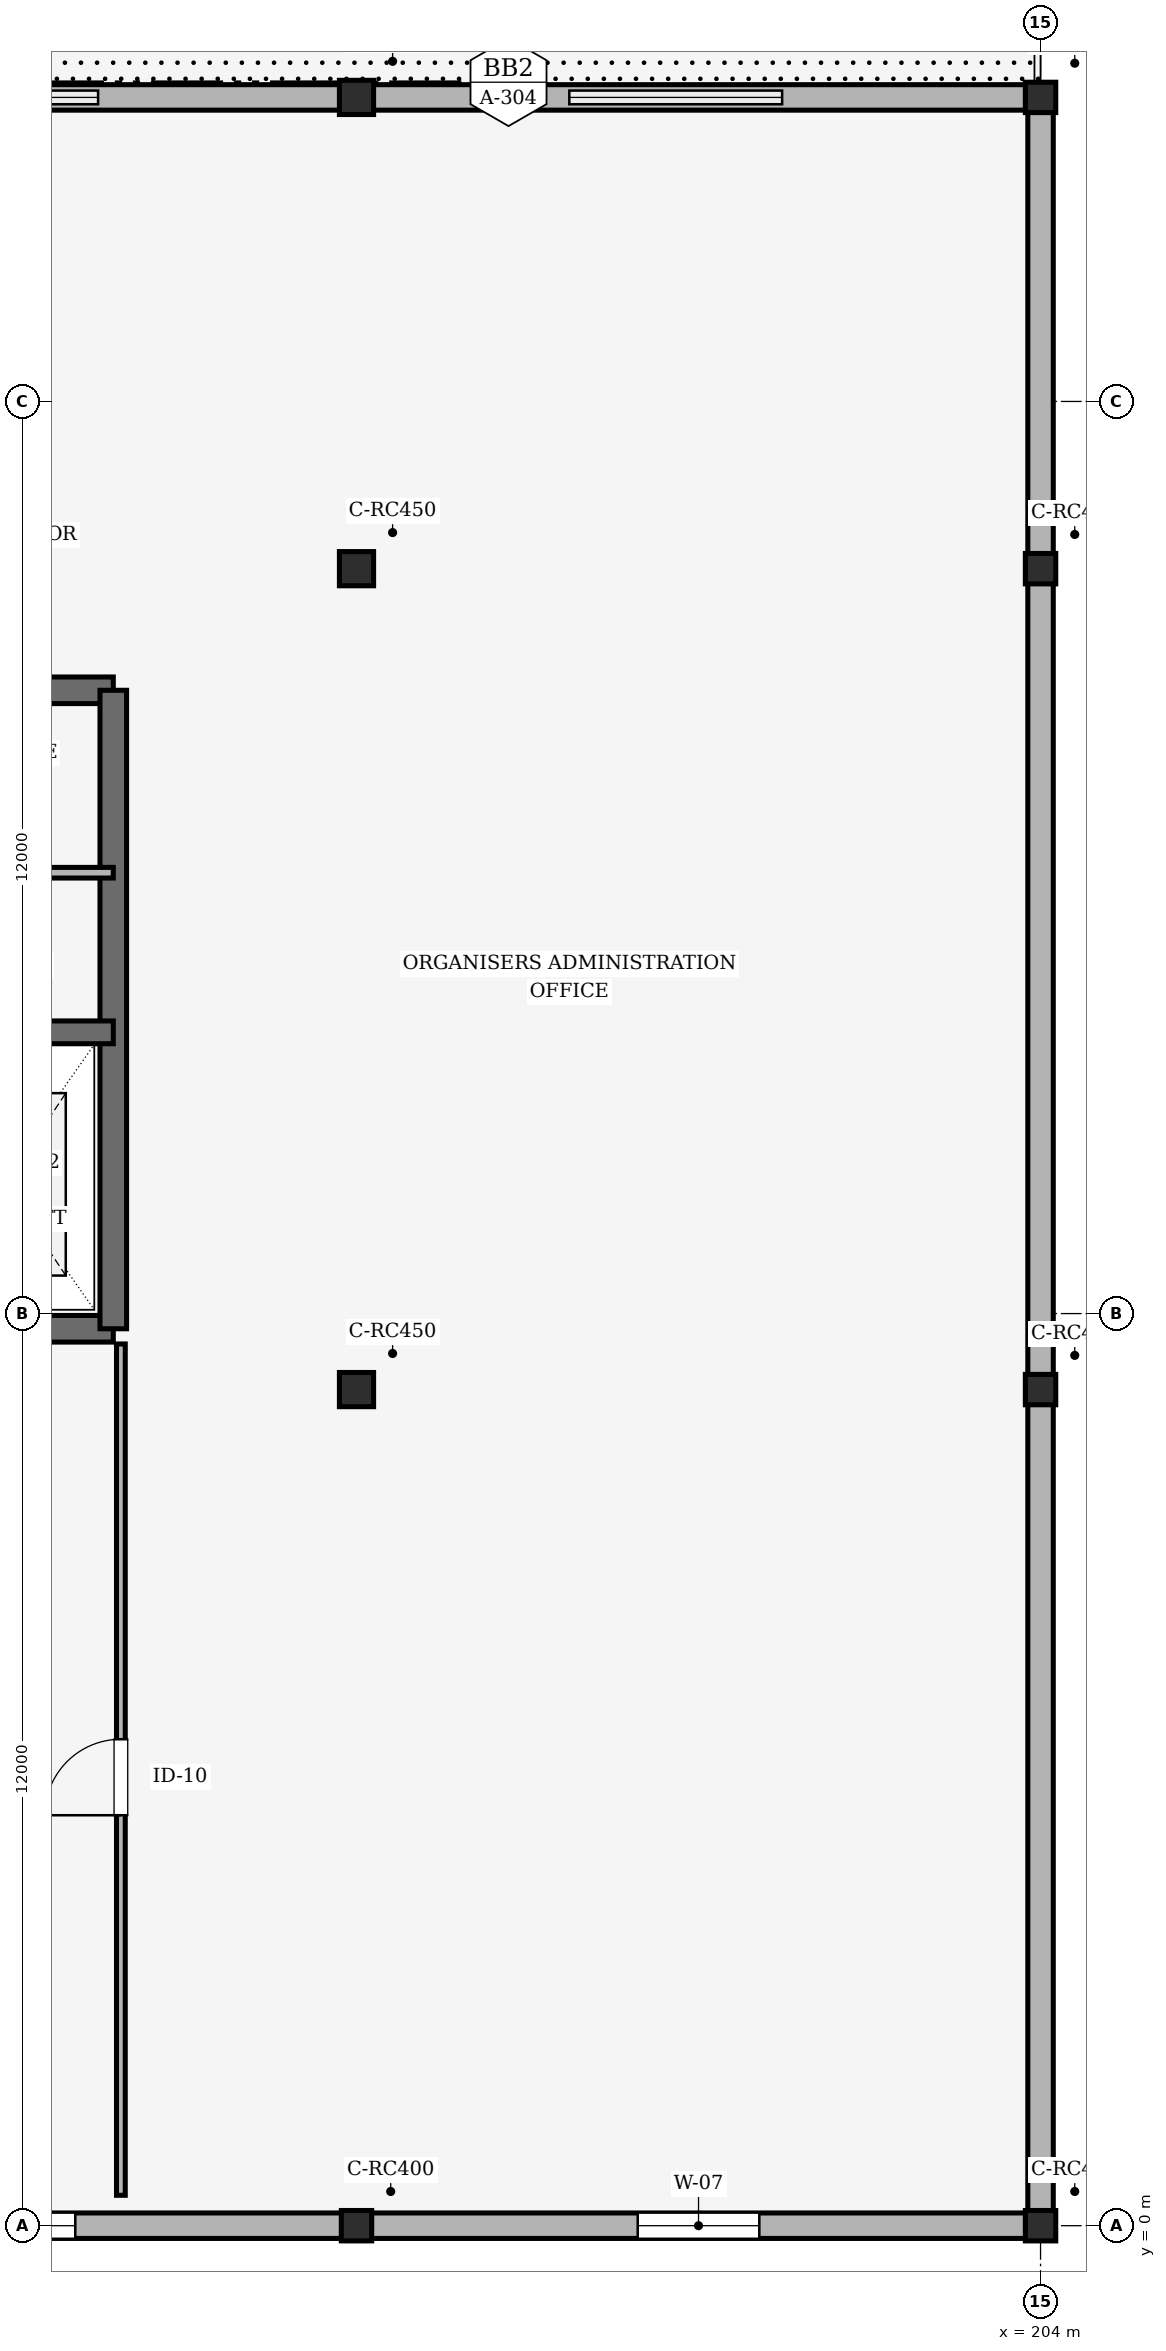
"""IFC4 building model, lengths in metres.
Left out: names, types, materials, properties, quantities, classifications, styles, units other than length and angle.
Written with IfcOpenShell. Run it as: python <this file> out.ifc"""

import sys

from ifc_helpers import new_model, si_unit, direction, frame, frame_2d, origin, origin_2d, place, context, subcontext, project, spatial, rectangle, extrude, element, fill, save


model = new_model("IFC4")
c1 = context("Model", 3, precision=1e-05, world=origin(), true_north=direction((0.0, 1.0)))
c2 = subcontext(c1, "Body", "Model", "MODEL_VIEW")
j1 = project(units=[si_unit("LENGTHUNIT", "METRE"), si_unit("PLANEANGLEUNIT", "RADIAN")], contexts=[c1])
p1 = place(None, origin())
s1 = spatial("IfcSite", under=j1, at=p1, CompositionType="ELEMENT")
p2 = place(p1, origin())
s2 = spatial("IfcBuilding", under=s1, at=p2, CompositionType="ELEMENT")
p3 = place(p2, frame((0.0, 0.0, 16.2)))
s3 = spatial("IfcBuildingStorey", under=s2, at=p3, CompositionType="ELEMENT", Elevation=16.2)
p4 = place(p3, frame((195.0, 0.0, 0.0), z_axis=(0.0, 0.0, 1.0), x_axis=(1.0, 0.0, 0.0)))
e1 = element("IfcColumn", 1, at=p4, inside=s3, PredefinedType="COLUMN", context=c2, shape_type="SweptSolid", body=[
    extrude(rectangle(XDim=0.4, YDim=0.4, at=origin_2d()), origin(), (0.0, 0.0, 1.0), 4.5),
])
for number, where, z_axis, x_axis in (
    (2, (195.0, 11.0, 0.0), (0.0, 0.0, 1.0), (1.0, 0.0, 0.0)),
    (3, (195.0, 21.8, 0.0), (0.0, 0.0, 1.0), (1.0, 0.0, 0.0)),
):
    element("IfcColumn", number, at=place(p3, frame(where, z_axis=z_axis, x_axis=x_axis)), inside=s3, PredefinedType="COLUMN", context=c2, shape_type="SweptSolid", body=[
        extrude(rectangle(XDim=0.45, YDim=0.45, at=origin_2d()), origin(), (0.0, 0.0, 1.0), 4.5),
    ])
for number, where, z_axis, x_axis in (
    (4, (204.0, 0.0, 0.0), (0.0, 0.0, 1.0), (1.0, 0.0, 0.0)),
    (5, (204.0, 11.0, 0.0), (0.0, 0.0, 1.0), (1.0, 0.0, 0.0)),
    (6, (204.0, 21.8, 0.0), (0.0, 0.0, 1.0), (1.0, 0.0, 0.0)),
):
    element("IfcColumn", number, at=place(p3, frame(where, z_axis=z_axis, x_axis=x_axis)), inside=s3, PredefinedType="COLUMN", context=c2, shape_type="SweptSolid", body=[
        extrude(rectangle(XDim=0.4, YDim=0.4, at=origin_2d()), origin(), (0.0, 0.0, 1.0), 4.5),
    ])
p5 = place(p3, frame((195.0, 28.0, 0.0), z_axis=(0.0, 0.0, 1.0), x_axis=(1.0, 0.0, 0.0)))
e7 = element("IfcColumn", 7, at=p5, inside=s3, PredefinedType="COLUMN", context=c2, shape_type="SweptSolid", body=[
    extrude(rectangle(XDim=0.45, YDim=0.45, at=origin_2d()), origin(), (0.0, 0.0, 1.0), 4.5),
])
p6 = place(p3, frame((204.0, 28.0, 0.0), z_axis=(0.0, 0.0, 1.0), x_axis=(1.0, 0.0, 0.0)))
e8 = element("IfcColumn", 8, at=p6, inside=s3, PredefinedType="COLUMN", context=c2, shape_type="SweptSolid", body=[
    extrude(rectangle(XDim=0.4, YDim=0.4, at=origin_2d()), origin(), (0.0, 0.0, 1.0), 4.5),
])
p7 = place(p3, frame((186.0, 0.0, 0.0), z_axis=(0.0, 0.0, 1.0), x_axis=(1.0, 0.0, 0.0)))
e9 = element("IfcWall", 9, at=p7, inside=s3, PredefinedType="SOLIDWALL", context=c2, shape_type="SweptSolid", body=[
    extrude(rectangle(XDim=9.0, YDim=0.335, at=frame_2d((4.5, 0.0))), origin(), (0.0, 0.0, 1.0), 3.5),
])
p8 = place(p7, frame((3.7, 0.0, 0.85)))
e10 = element("IfcOpeningElement", 10, at=p8, cuts=e9, PredefinedType="OPENING", context=c2, shape_type="SweptSolid", body=[
    extrude(rectangle(XDim=1.6, YDim=2.35, at=frame_2d((0.8, 1.175))), frame((0.0, 0.177, 0.0), z_axis=(0.0, -1.0, 0.0), x_axis=(1.0, 0.0, 0.0)), (0.0, 0.0, 1.0), 0.355),
])
p9 = place(p3, frame((195.0, 28.0, 0.0), z_axis=(0.0, 0.0, 1.0), x_axis=(-1.0, 0.0, 0.0)))
e11 = element("IfcWall", 11, at=p9, inside=s3, PredefinedType="SOLIDWALL", context=c2, shape_type="SweptSolid", body=[
    extrude(rectangle(XDim=9.0, YDim=0.335, at=frame_2d((4.5, 0.0))), origin(), (0.0, 0.0, 1.0), 0.45),
])
p10 = place(p3, frame((195.0, 0.0, 0.0), z_axis=(0.0, 0.0, 1.0), x_axis=(1.0, 0.0, 0.0)))
e12 = element("IfcWall", 12, at=p10, inside=s3, PredefinedType="SOLIDWALL", context=c2, shape_type="SweptSolid", body=[
    extrude(rectangle(XDim=9.0, YDim=0.335, at=frame_2d((4.5, 0.0))), origin(), (0.0, 0.0, 1.0), 3.5),
])
p11 = place(p10, frame((3.7, 0.0, 0.85)))
e13 = element("IfcOpeningElement", 13, at=p11, cuts=e12, PredefinedType="OPENING", context=c2, shape_type="SweptSolid", body=[
    extrude(rectangle(XDim=1.6, YDim=2.35, at=frame_2d((0.8, 1.175))), frame((0.0, 0.177, 0.0), z_axis=(0.0, -1.0, 0.0), x_axis=(1.0, 0.0, 0.0)), (0.0, 0.0, 1.0), 0.355),
])
p12 = place(p3, frame((204.0, 28.0, 0.0), z_axis=(0.0, 0.0, 1.0), x_axis=(-1.0, 0.0, 0.0)))
e14 = element("IfcWall", 14, at=p12, inside=s3, PredefinedType="SOLIDWALL", context=c2, shape_type="SweptSolid", body=[
    extrude(rectangle(XDim=9.0, YDim=0.335, at=frame_2d((4.5, 0.0))), origin(), (0.0, 0.0, 1.0), 0.45),
])
p13 = place(p3, frame((204.0, 0.0, 0.0), z_axis=(0.0, 0.0, 1.0), x_axis=(0.0, 1.0, 0.0)))
e15 = element("IfcWall", 15, at=p13, inside=s3, PredefinedType="SOLIDWALL", context=c2, shape_type="SweptSolid", body=[
    extrude(rectangle(XDim=28.0, YDim=0.335, at=frame_2d((14.0, 0.0))), origin(), (0.0, 0.0, 1.0), 3.5),
])
for number, where, z_axis, x_axis in (
    (16, (181.6, 11.8, 0.0), (0.0, 0.0, 1.0), (1.0, 0.0, 0.0)),
    (17, (191.8, 20.2, 0.0), (0.0, 0.0, 1.0), (-1.0, 0.0, 0.0)),
):
    element("IfcWall", number, at=place(p3, frame(where, z_axis=z_axis, x_axis=x_axis)), inside=s3, PredefinedType="SHEAR", context=c2, shape_type="SweptSolid", body=[
        extrude(rectangle(XDim=10.2, YDim=0.35, at=frame_2d((5.1, 0.0))), origin(), (0.0, 0.0, 1.0), 4.5),
    ])
p14 = place(p3, frame((191.8, 11.8, 0.0), z_axis=(0.0, 0.0, 1.0), x_axis=(0.0, 1.0, 0.0)))
e18 = element("IfcWall", 18, at=p14, inside=s3, PredefinedType="SHEAR", context=c2, shape_type="SweptSolid", body=[
    extrude(rectangle(XDim=8.4, YDim=0.35, at=frame_2d((4.2, 0.0))), origin(), (0.0, 0.0, 1.0), 4.5),
])
p15 = place(p3, frame((181.6, 15.7, 0.0), z_axis=(0.0, 0.0, 1.0), x_axis=(1.0, 0.0, 0.0)))
e19 = element("IfcWall", 19, at=p15, inside=s3, PredefinedType="SHEAR", context=c2, shape_type="SweptSolid", body=[
    extrude(rectangle(XDim=10.2, YDim=0.3, at=frame_2d((5.1, 0.0))), origin(), (0.0, 0.0, 1.0), 4.5),
])
p16 = place(p15, frame((0.28, 0.0, 0.0)))
e20 = element("IfcOpeningElement", 20, at=p16, cuts=e19, PredefinedType="OPENING", context=c2, shape_type="SweptSolid", body=[
    extrude(rectangle(XDim=1.45, YDim=2.15, at=frame_2d((0.725, 1.075))), frame((0.0, 0.16, 0.0), z_axis=(0.0, -1.0, 0.0), x_axis=(1.0, 0.0, 0.0)), (0.0, 0.0, 1.0), 0.32),
])
p17 = place(p15, frame((8.225, 0.0, 0.0)))
e21 = element("IfcOpeningElement", 21, at=p17, cuts=e19, PredefinedType="OPENING", context=c2, shape_type="SweptSolid", body=[
    extrude(rectangle(XDim=1.1, YDim=2.15, at=frame_2d((0.55, 1.075))), frame((0.0, 0.16, 0.0), z_axis=(0.0, -1.0, 0.0), x_axis=(1.0, 0.0, 0.0)), (0.0, 0.0, 1.0), 0.32),
])
p18 = place(p3, frame((181.6, 17.8, 0.0), z_axis=(0.0, 0.0, 1.0), x_axis=(1.0, 0.0, 0.0)))
e22 = element("IfcWall", 22, at=p18, inside=s3, PredefinedType="PARTITIONING", context=c2, shape_type="SweptSolid", body=[
    extrude(rectangle(XDim=10.2, YDim=0.14, at=frame_2d((5.1, 0.0))), origin(), (0.0, 0.0, 1.0), 3.565),
])
p19 = place(p18, frame((0.9, 0.0, 0.0)))
e23 = element("IfcOpeningElement", 23, at=p19, cuts=e22, PredefinedType="OPENING", context=c2, shape_type="SweptSolid", body=[
    extrude(rectangle(XDim=0.9, YDim=2.1, at=frame_2d((0.45, 1.05))), frame((0.0, 0.08, 0.0), z_axis=(0.0, -1.0, 0.0), x_axis=(1.0, 0.0, 0.0)), (0.0, 0.0, 1.0), 0.16),
])
p20 = place(p18, frame((4.3, 0.0, 0.0)))
e24 = element("IfcOpeningElement", 24, at=p20, cuts=e22, PredefinedType="OPENING", context=c2, shape_type="SweptSolid", body=[
    extrude(rectangle(XDim=0.9, YDim=2.1, at=frame_2d((0.45, 1.05))), frame((0.0, 0.08, 0.0), z_axis=(0.0, -1.0, 0.0), x_axis=(1.0, 0.0, 0.0)), (0.0, 0.0, 1.0), 0.16),
])
p21 = place(p18, frame((7.7, 0.0, 0.0)))
e25 = element("IfcOpeningElement", 25, at=p21, cuts=e22, PredefinedType="OPENING", context=c2, shape_type="SweptSolid", body=[
    extrude(rectangle(XDim=0.95, YDim=2.1, at=frame_2d((0.475, 1.05))), frame((0.0, 0.08, 0.0), z_axis=(0.0, -1.0, 0.0), x_axis=(1.0, 0.0, 0.0)), (0.0, 0.0, 1.0), 0.16),
])
p22 = place(p3, frame((191.9, 0.4, 0.0), z_axis=(0.0, 0.0, 1.0), x_axis=(0.0, 1.0, 0.0)))
e26 = element("IfcWall", 26, at=p22, inside=s3, PredefinedType="PARTITIONING", context=c2, shape_type="SweptSolid", body=[
    extrude(rectangle(XDim=11.2, YDim=0.115, at=frame_2d((5.6, 0.0))), origin(), (0.0, 0.0, 1.0), 3.565),
])
p23 = place(p22, frame((5.0, 0.0, 0.0)))
e27 = element("IfcOpeningElement", 27, at=p23, cuts=e26, PredefinedType="OPENING", context=c2, shape_type="SweptSolid", body=[
    extrude(rectangle(XDim=1.0, YDim=2.15, at=frame_2d((0.5, 1.075))), frame((0.0, 0.067, 0.0), z_axis=(0.0, -1.0, 0.0), x_axis=(1.0, 0.0, 0.0)), (0.0, 0.0, 1.0), 0.135),
])
p24 = place(p8, origin())
e28 = element("IfcWindow", 28, at=p24, inside=s3, PartitioningType="DOUBLE_PANEL_VERTICAL", PredefinedType="WINDOW", context=c2, shape_type="SweptSolid", body=[
    extrude(rectangle(XDim=1.6, YDim=2.35, at=frame_2d((0.8, 1.175))), frame((0.0, 0.03, 0.0), z_axis=(0.0, -1.0, 0.0), x_axis=(1.0, 0.0, 0.0)), (0.0, 0.0, 1.0), 0.06),
])
fill(e10, e28)
p25 = place(p11, origin())
e29 = element("IfcWindow", 29, at=p25, inside=s3, PartitioningType="DOUBLE_PANEL_VERTICAL", PredefinedType="WINDOW", context=c2, shape_type="SweptSolid", body=[
    extrude(rectangle(XDim=1.6, YDim=2.35, at=frame_2d((0.8, 1.175))), frame((0.0, 0.03, 0.0), z_axis=(0.0, -1.0, 0.0), x_axis=(1.0, 0.0, 0.0)), (0.0, 0.0, 1.0), 0.06),
])
fill(e13, e29)
p26 = place(p23, origin())
e30 = element("IfcDoor", 30, at=p26, inside=s3, OperationType="SINGLE_SWING_LEFT", PredefinedType="DOOR", context=c2, shape_type="SweptSolid", body=[
    extrude(rectangle(XDim=1.0, YDim=2.15, at=frame_2d((0.5, 1.075))), frame((0.0, 0.025, 0.0), z_axis=(0.0, -1.0, 0.0), x_axis=(1.0, 0.0, 0.0)), (0.0, 0.0, 1.0), 0.05),
])
fill(e27, e30)
save(model, sys.argv[1])
